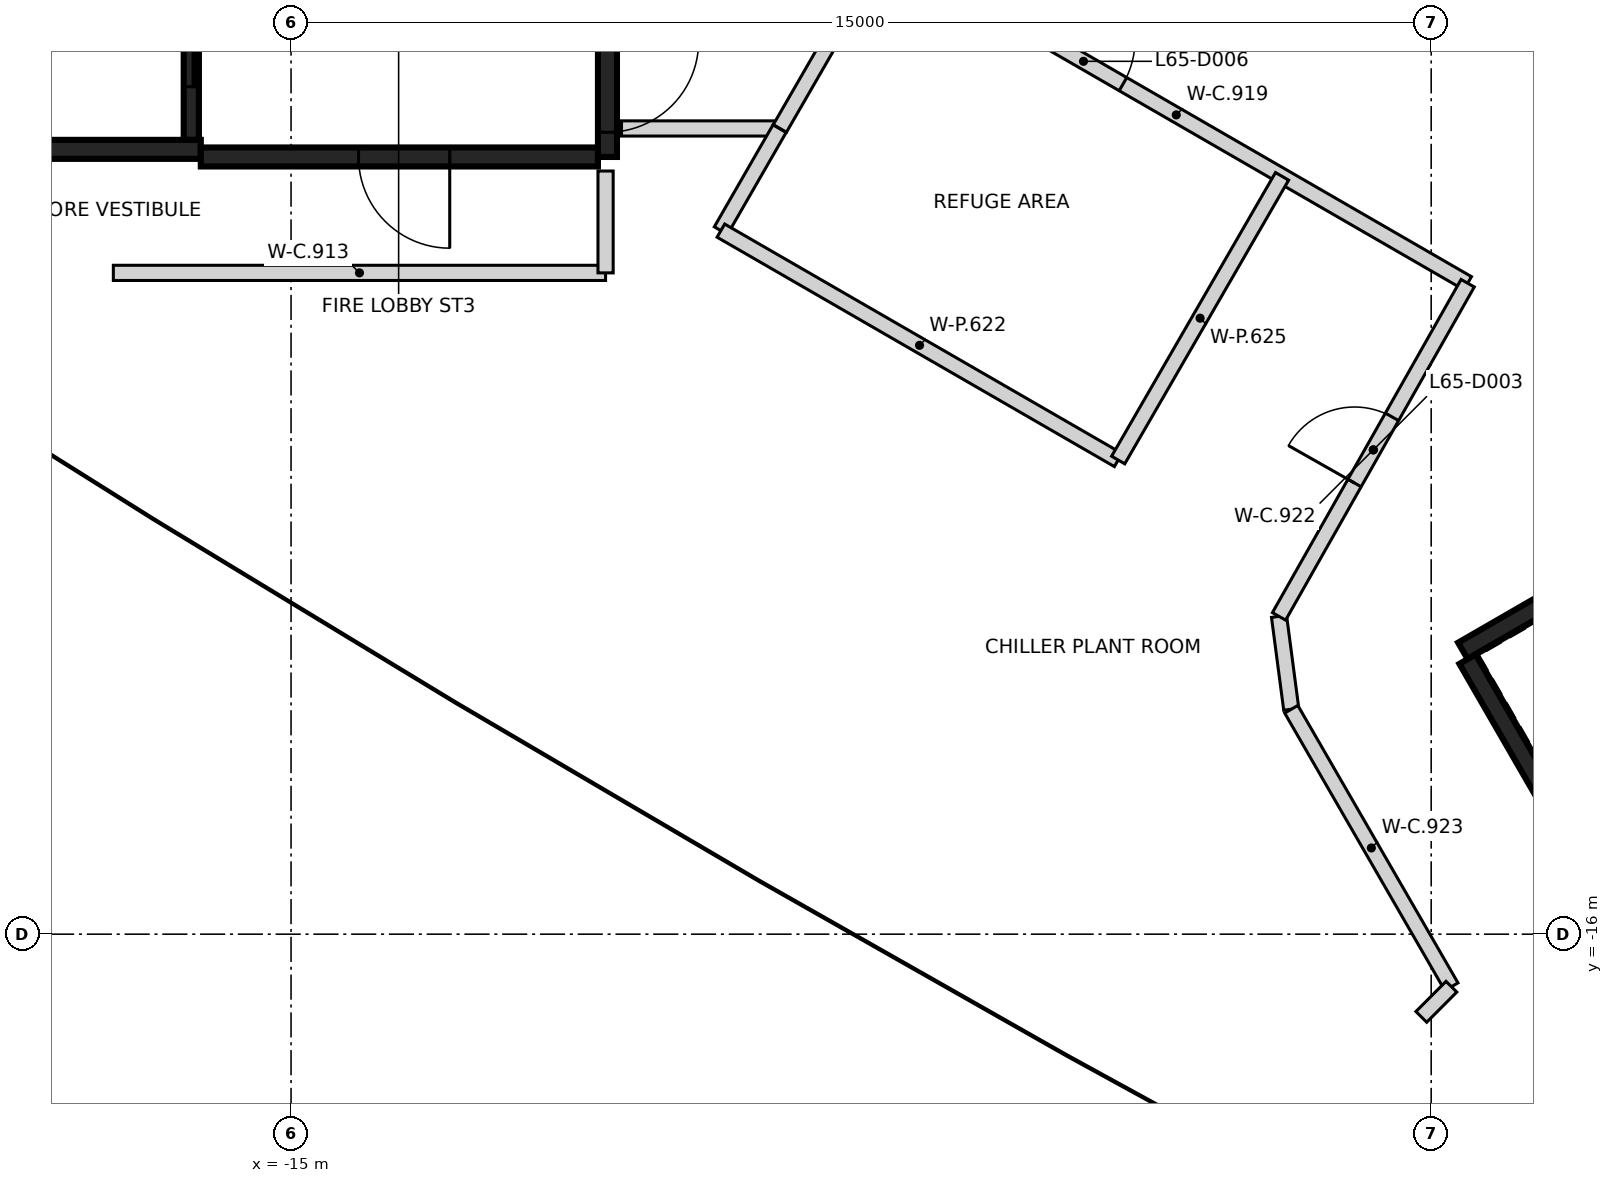
"""IFC4 building model, lengths in metres.
Left out: names, types, materials, properties, quantities, classifications, styles, units other than length and angle.
Written with IfcOpenShell. Run it as: python <this file> out.ifc"""

import sys

from ifc_helpers import new_model, si_unit, direction, frame, frame_2d, origin, place, context, subcontext, project, spatial, rectangle, extrude, element, fill, save


model = new_model("IFC4")
c1 = context("Model", 3, precision=1e-05, world=origin(), true_north=direction((0.0, 1.0)))
c2 = subcontext(c1, "Body", "Model", "MODEL_VIEW")
j1 = project(units=[si_unit("LENGTHUNIT", "METRE"), si_unit("PLANEANGLEUNIT", "RADIAN")], contexts=[c1])
p1 = place(None, origin())
s1 = spatial("IfcSite", under=j1, at=p1, CompositionType="ELEMENT")
p2 = place(p1, origin())
s2 = spatial("IfcBuilding", under=s1, at=p2, CompositionType="ELEMENT")
p3 = place(p2, frame((0.0, 0.0, 257.4)))
s3 = spatial("IfcBuildingStorey", under=s2, at=p3, CompositionType="ELEMENT", Elevation=257.4)
p4 = place(p3, frame((-10.837, 5.775, 0.0), z_axis=(0.0, 0.0, 1.0), x_axis=(0.0, -1.0, 0.0)))
e1 = element("IfcWall", 1, at=p4, inside=s3, PredefinedType="SHEAR", context=c2, shape_type="SweptSolid", body=[
    extrude(rectangle(XDim=11.55, YDim=0.25, at=frame_2d((5.775, 0.0))), origin(), (0.0, 0.0, 1.0), 4.45),
])
p5 = place(p4, frame((10.025, 0.0, 0.0)))
e2 = element("IfcOpeningElement", 2, at=p5, cuts=e1, PredefinedType="OPENING", context=c2, shape_type="SweptSolid", body=[
    extrude(rectangle(XDim=1.2, YDim=2.1, at=frame_2d((0.6, 1.05))), frame((0.0, 0.135, 0.0), z_axis=(0.0, -1.0, 0.0), x_axis=(1.0, 0.0, 0.0)), (0.0, 0.0, 1.0), 0.27),
])
p6 = place(p4, frame((8.725, 0.0, 0.0)))
e3 = element("IfcOpeningElement", 3, at=p6, cuts=e1, PredefinedType="OPENING", context=c2, shape_type="SweptSolid", body=[
    extrude(rectangle(XDim=1.2, YDim=2.1, at=frame_2d((0.6, 1.05))), frame((0.0, 0.135, 0.0), z_axis=(0.0, -1.0, 0.0), x_axis=(1.0, 0.0, 0.0)), (0.0, 0.0, 1.0), 0.27),
])
p7 = place(p3, frame((-16.187, -5.675, 0.0), z_axis=(0.0, 0.0, 1.0), x_axis=(-1.0, 0.0, 0.0)))
e4 = element("IfcWall", 4, at=p7, inside=s3, PredefinedType="SHEAR", context=c2, shape_type="SweptSolid", body=[
    extrude(rectangle(XDim=6.125, YDim=0.25, at=frame_2d((3.062, 0.0))), origin(), (0.0, 0.0, 1.0), 4.45),
])
p8 = place(p7, frame((3.563, 0.0, 0.0)))
e5 = element("IfcOpeningElement", 5, at=p8, cuts=e4, PredefinedType="OPENING", context=c2, shape_type="SweptSolid", body=[
    extrude(rectangle(XDim=1.0, YDim=2.1, at=frame_2d((0.5, 1.05))), frame((0.0, 0.135, 0.0), z_axis=(0.0, -1.0, 0.0), x_axis=(1.0, 0.0, 0.0)), (0.0, 0.0, 1.0), 0.27),
])
p9 = place(p3, frame((-10.963, -5.775, 0.0), z_axis=(0.0, 0.0, 1.0), x_axis=(-1.0, 0.0, 0.0)))
e6 = element("IfcWall", 6, at=p9, inside=s3, PredefinedType="SHEAR", context=c2, shape_type="SweptSolid", body=[
    extrude(rectangle(XDim=5.225, YDim=0.25, at=frame_2d((2.612, 0.0))), origin(), (0.0, 0.0, 1.0), 4.45),
])
p10 = place(p9, frame((1.95, 0.0, 0.0)))
e7 = element("IfcOpeningElement", 7, at=p10, cuts=e6, PredefinedType="OPENING", context=c2, shape_type="SweptSolid", body=[
    extrude(rectangle(XDim=1.2, YDim=2.1, at=frame_2d((0.6, 1.05))), frame((0.0, 0.135, 0.0), z_axis=(0.0, -1.0, 0.0), x_axis=(1.0, 0.0, 0.0)), (0.0, 0.0, 1.0), 0.27),
])
p11 = place(p3, frame((-16.312, -2.898, 0.0), z_axis=(0.0, 0.0, 1.0), x_axis=(0.0, -1.0, 0.0)))
e8 = element("IfcWall", 8, at=p11, inside=s3, PredefinedType="SHEAR", context=c2, shape_type="SweptSolid", body=[
    extrude(rectangle(XDim=2.651, YDim=0.2, at=frame_2d((1.325, 0.0))), origin(), (0.0, 0.0, 1.0), 4.45),
])
p12 = place(p11, frame((0.652, 0.0, 0.0)))
e9 = element("IfcOpeningElement", 9, at=p12, cuts=e8, PredefinedType="OPENING", context=c2, shape_type="SweptSolid", body=[
    extrude(rectangle(XDim=1.3, YDim=2.1, at=frame_2d((0.65, 1.05))), frame((0.0, 0.11, 0.0), z_axis=(0.0, -1.0, 0.0), x_axis=(1.0, 0.0, 0.0)), (0.0, 0.0, 1.0), 0.22),
])
p13 = place(p3, frame((0.417, -12.273, 0.0), z_axis=(0.0, 0.0, 1.0), x_axis=(0.866021906294, 0.500006057782, 0.0)))
e10 = element("IfcWall", 10, at=p13, inside=s3, PredefinedType="SHEAR", context=c2, shape_type="SweptSolid", body=[
    extrude(rectangle(XDim=11.55, YDim=0.25, at=frame_2d((5.775, 0.0))), origin(), (0.0, 0.0, 1.0), 4.45),
])
p14 = place(p13, frame((10.025, 0.0, 0.0)))
e11 = element("IfcOpeningElement", 11, at=p14, cuts=e10, PredefinedType="OPENING", context=c2, shape_type="SweptSolid", body=[
    extrude(rectangle(XDim=1.2, YDim=2.1, at=frame_2d((0.6, 1.05))), frame((0.0, 0.135, 0.0), z_axis=(0.0, -1.0, 0.0), x_axis=(1.0, 0.0, 0.0)), (0.0, 0.0, 1.0), 0.27),
])
p15 = place(p13, frame((8.725, 0.0, 0.0)))
e12 = element("IfcOpeningElement", 12, at=p15, cuts=e10, PredefinedType="OPENING", context=c2, shape_type="SweptSolid", body=[
    extrude(rectangle(XDim=1.2, YDim=2.1, at=frame_2d((0.6, 1.05))), frame((0.0, 0.135, 0.0), z_axis=(0.0, -1.0, 0.0), x_axis=(1.0, 0.0, 0.0)), (0.0, 0.0, 1.0), 0.27),
])
p16 = place(p3, frame((3.235, -17.153, 0.0), z_axis=(0.0, 0.0, 1.0), x_axis=(-0.500008851346, 0.866020293397, 0.0)))
e13 = element("IfcWall", 13, at=p16, inside=s3, PredefinedType="SHEAR", context=c2, shape_type="SweptSolid", body=[
    extrude(rectangle(XDim=5.51, YDim=0.25, at=frame_2d((2.755, 0.0))), origin(), (0.0, 0.0, 1.0), 4.45),
])
p17 = place(p3, frame((-17.338, -7.3, 0.0), z_axis=(0.0, 0.0, 1.0), x_axis=(1.0, 0.0, 0.0)))
e14 = element("IfcWall", 14, at=p17, inside=s3, PredefinedType="PARTITIONING", context=c2, shape_type="SweptSolid", body=[
    extrude(rectangle(XDim=6.476, YDim=0.2, at=frame_2d((3.238, 0.0))), origin(), (0.0, 0.0, 1.0), 4.45),
])
p18 = place(p3, frame((-10.862, -7.3, 0.0), z_axis=(0.0, 0.0, 1.0), x_axis=(0.0, 1.0, 0.0)))
e15 = element("IfcWall", 15, at=p18, inside=s3, PredefinedType="PARTITIONING", context=c2, shape_type="SweptSolid", body=[
    extrude(rectangle(XDim=1.34, YDim=0.2, at=frame_2d((0.67, 0.0))), origin(), (0.0, 0.0, 1.0), 4.45),
])
p19 = place(p3, frame((-10.652, -5.4, 0.0), z_axis=(0.0, 0.0, 1.0), x_axis=(1.0, 0.0, 0.0)))
e16 = element("IfcWall", 16, at=p19, inside=s3, PredefinedType="PARTITIONING", context=c2, shape_type="SweptSolid", body=[
    extrude(rectangle(XDim=2.083, YDim=0.2, at=frame_2d((1.042, 0.0))), origin(), (0.0, 0.0, 1.0), 4.45),
])
p20 = place(p3, frame((-8.569, -5.4, 0.0), z_axis=(0.0, 0.0, 1.0), x_axis=(0.499934255424, 0.866063358106, 0.0)))
e17 = element("IfcWall", 17, at=p20, inside=s3, PredefinedType="PARTITIONING", context=c2, shape_type="SweptSolid", body=[
    extrude(rectangle(XDim=2.76, YDim=0.2, at=frame_2d((1.38, 0.0))), origin(), (0.0, 0.0, 1.0), 4.45),
])
p21 = place(p3, frame((-7.188, -3.007, 0.0), z_axis=(0.0, 0.0, 1.0), x_axis=(0.865946804656, -0.500136112979, 0.0)))
e18 = element("IfcWall", 18, at=p21, inside=s3, PredefinedType="PARTITIONING", context=c2, shape_type="SweptSolid", body=[
    extrude(rectangle(XDim=8.855, YDim=0.2, at=frame_2d((4.427, 0.0))), origin(), (0.0, 0.0, 1.0), 4.45),
])
p22 = place(p21, frame((2.418, 0.0, 0.0)))
e19 = element("IfcOpeningElement", 19, at=p22, cuts=e18, PredefinedType="OPENING", context=c2, shape_type="SweptSolid", body=[
    extrude(rectangle(XDim=1.2, YDim=2.1, at=frame_2d((0.6, 1.05))), frame((0.0, 0.11, 0.0), z_axis=(0.0, -1.0, 0.0), x_axis=(1.0, 0.0, 0.0)), (0.0, 0.0, 1.0), 0.22),
])
p23 = place(p3, frame((-2.002, -11.819, 0.0), z_axis=(0.0, 0.0, 1.0), x_axis=(0.130541623332, -0.991442829707, 0.0)))
e20 = element("IfcWall", 20, at=p23, inside=s3, PredefinedType="PARTITIONING", context=c2, shape_type="SweptSolid", body=[
    extrude(rectangle(XDim=1.232, YDim=0.2, at=frame_2d((0.616, 0.0))), origin(), (0.0, 0.0, 1.0), 4.45),
])
p24 = place(p3, frame((-2.002, -11.819, 0.0), z_axis=(0.0, 0.0, 1.0), x_axis=(0.492742275982, 0.870175298121, 0.0)))
e21 = element("IfcWall", 21, at=p24, inside=s3, PredefinedType="PARTITIONING", context=c2, shape_type="SweptSolid", body=[
    extrude(rectangle(XDim=5.037, YDim=0.2, at=frame_2d((2.519, 0.0))), origin(), (0.0, 0.0, 1.0), 4.45),
])
p25 = place(p24, frame((2.016, 0.0, 0.0)))
e22 = element("IfcOpeningElement", 22, at=p25, cuts=e21, PredefinedType="OPENING", context=c2, shape_type="SweptSolid", body=[
    extrude(rectangle(XDim=1.0, YDim=2.1, at=frame_2d((0.5, 1.05))), frame((0.0, 0.11, 0.0), z_axis=(0.0, -1.0, 0.0), x_axis=(1.0, 0.0, 0.0)), (0.0, 0.0, 1.0), 0.22),
])
p26 = place(p3, frame((-1.841, -13.041, 0.0), z_axis=(0.0, 0.0, 1.0), x_axis=(0.499983206745, -0.866035099158, 0.0)))
e23 = element("IfcWall", 23, at=p26, inside=s3, PredefinedType="PARTITIONING", context=c2, shape_type="SweptSolid", body=[
    extrude(rectangle(XDim=4.215, YDim=0.2, at=frame_2d((2.107, 0.0))), origin(), (0.0, 0.0, 1.0), 4.45),
])
p27 = place(p3, frame((-0.13, -17.088, 0.0), z_axis=(0.0, 0.0, 1.0), x_axis=(0.706235424469, 0.707977065466, 0.0)))
e24 = element("IfcWall", 24, at=p27, inside=s3, PredefinedType="PARTITIONING", context=c2, shape_type="SweptSolid", body=[
    extrude(rectangle(XDim=0.561, YDim=0.2, at=frame_2d((0.28, 0.0))), origin(), (0.0, 0.0, 1.0), 4.45),
])
p28 = place(p3, frame((-9.345, -6.744, 0.0), z_axis=(0.0, 0.0, 1.0), x_axis=(0.49895726232, 0.86662659224, 0.0)))
e25 = element("IfcWall", 25, at=p28, inside=s3, PredefinedType="PARTITIONING", context=c2, shape_type="SweptSolid", body=[
    extrude(rectangle(XDim=1.547, YDim=0.2, at=frame_2d((0.773, 0.0))), origin(), (0.0, 0.0, 1.0), 4.45),
])
p29 = place(p3, frame((-9.345, -6.744, 0.0), z_axis=(0.0, 0.0, 1.0), x_axis=(0.866009101611, -0.500028235129, 0.0)))
e26 = element("IfcWall", 26, at=p29, inside=s3, PredefinedType="PARTITIONING", context=c2, shape_type="SweptSolid", body=[
    extrude(rectangle(XDim=6.036, YDim=0.2, at=frame_2d((3.018, 0.0))), origin(), (0.0, 0.0, 1.0), 4.45),
])
p30 = place(p3, frame((-4.118, -9.762, 0.0), z_axis=(0.0, 0.0, 1.0), x_axis=(0.500238903755, 0.865887428694, 0.0)))
e27 = element("IfcWall", 27, at=p30, inside=s3, PredefinedType="PARTITIONING", context=c2, shape_type="SweptSolid", body=[
    extrude(rectangle(XDim=4.31, YDim=0.2, at=frame_2d((2.155, 0.0))), origin(), (0.0, 0.0, 1.0), 4.45),
])
p31 = place(p12, origin())
e28 = element("IfcDoor", 28, at=p31, inside=s3, OperationType="SLIDING_TO_RIGHT", PredefinedType="DOOR", context=c2, shape_type="SweptSolid", body=[
    extrude(rectangle(XDim=1.3, YDim=2.1, at=frame_2d((0.65, 1.05))), frame((0.0, 0.025, 0.0), z_axis=(0.0, -1.0, 0.0), x_axis=(1.0, 0.0, 0.0)), (0.0, 0.0, 1.0), 0.05),
])
fill(e9, e28)
p32 = place(p5, origin())
e29 = element("IfcDoor", 29, at=p32, inside=s3, OperationType="SINGLE_SWING_LEFT", PredefinedType="DOOR", context=c2, shape_type="SweptSolid", body=[
    extrude(rectangle(XDim=1.2, YDim=2.1, at=frame_2d((0.6, 1.05))), frame((0.0, 0.025, 0.0), z_axis=(0.0, -1.0, 0.0), x_axis=(1.0, 0.0, 0.0)), (0.0, 0.0, 1.0), 0.05),
])
fill(e2, e29)
p33 = place(p10, origin())
e30 = element("IfcDoor", 30, at=p33, inside=s3, OperationType="SINGLE_SWING_LEFT", PredefinedType="DOOR", context=c2, shape_type="SweptSolid", body=[
    extrude(rectangle(XDim=1.2, YDim=2.1, at=frame_2d((0.6, 1.05))), frame((0.0, 0.025, 0.0), z_axis=(0.0, -1.0, 0.0), x_axis=(1.0, 0.0, 0.0)), (0.0, 0.0, 1.0), 0.05),
])
fill(e7, e30)
p34 = place(p25, origin())
e31 = element("IfcDoor", 31, at=p34, inside=s3, OperationType="SINGLE_SWING_LEFT", PredefinedType="DOOR", context=c2, shape_type="SweptSolid", body=[
    extrude(rectangle(XDim=1.0, YDim=2.1, at=frame_2d((0.5, 1.05))), frame((0.0, 0.025, 0.0), z_axis=(0.0, -1.0, 0.0), x_axis=(1.0, 0.0, 0.0)), (0.0, 0.0, 1.0), 0.05),
])
fill(e22, e31)
p35 = place(p22, frame((1.2, 0.0, 0.0), z_axis=(0.0, 0.0, 1.0), x_axis=(-1.0, 0.0, 0.0)))
e32 = element("IfcDoor", 32, at=p35, inside=s3, OperationType="SINGLE_SWING_LEFT", PredefinedType="DOOR", context=c2, shape_type="SweptSolid", body=[
    extrude(rectangle(XDim=1.2, YDim=2.1, at=frame_2d((0.6, 1.05))), frame((0.0, 0.025, 0.0), z_axis=(0.0, -1.0, 0.0), x_axis=(1.0, 0.0, 0.0)), (0.0, 0.0, 1.0), 0.05),
])
fill(e19, e32)
save(model, sys.argv[1])
